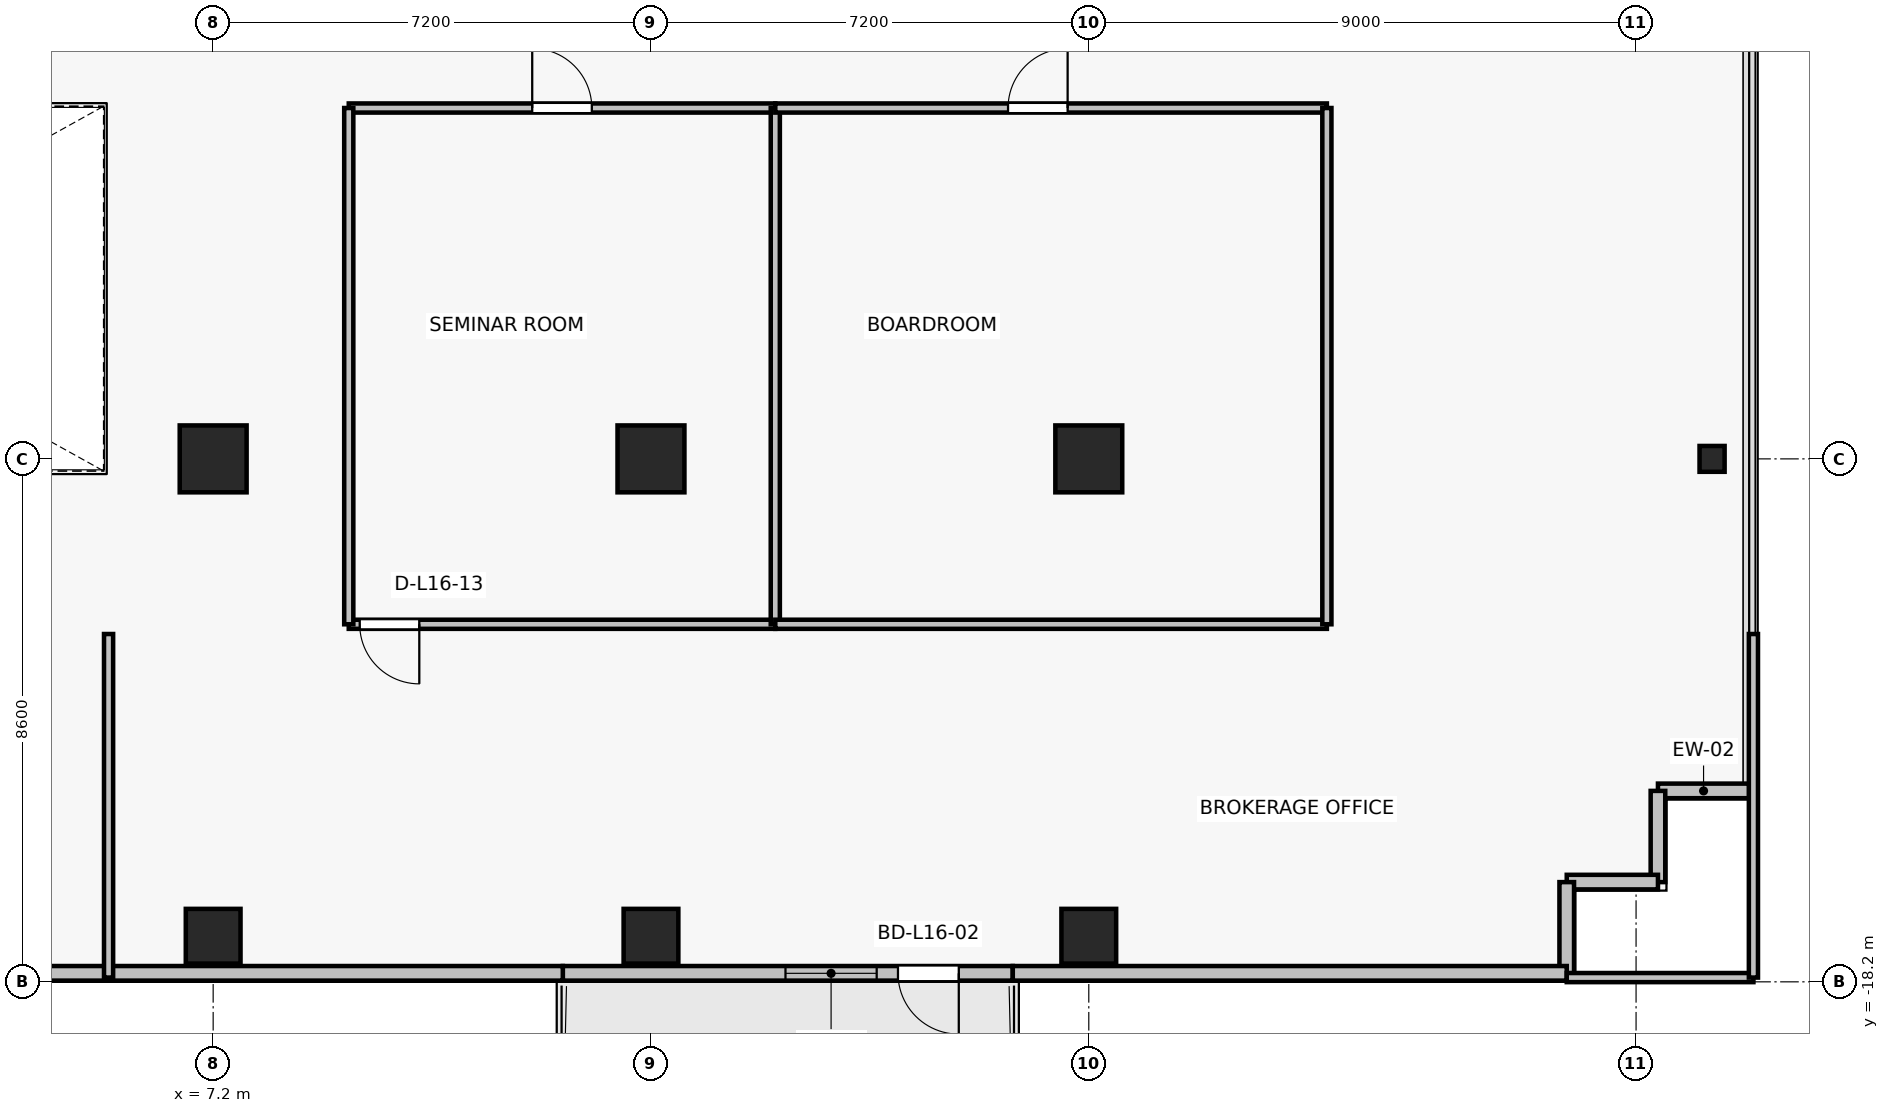
"""IFC4 building model, lengths in metres.
Left out: names, types, materials, properties, quantities, classifications, styles, units other than length and angle.
Written with IfcOpenShell. Run it as: python <this file> out.ifc"""

import sys

from ifc_helpers import new_model, si_unit, direction, frame, frame_2d, origin, origin_2d, place, context, subcontext, project, spatial, rectangle, i_section, extrude, source, transform, mapped, element, fill, save


model = new_model("IFC4")
c1 = context("Model", 3, precision=1e-05, world=origin(), true_north=direction((0.0, 1.0)))
c2 = subcontext(c1, "Body", "Model", "MODEL_VIEW")
j1 = project(units=[si_unit("LENGTHUNIT", "METRE"), si_unit("PLANEANGLEUNIT", "RADIAN")], contexts=[c1])
p1 = place(None, origin())
s1 = spatial("IfcSite", under=j1, at=p1, CompositionType="ELEMENT")
p2 = place(p1, origin())
s2 = spatial("IfcBuilding", under=s1, at=p2, CompositionType="ELEMENT")
p3 = place(p2, frame((0.0, 0.0, 60.4)))
s3 = spatial("IfcBuildingStorey", under=s2, at=p3, CompositionType="ELEMENT", Elevation=60.4)
for number, where, z_axis, x_axis in (
    (1, (7.2, -9.6, 0.0), (0.0, 0.0, 1.0), (1.0, 0.0, 0.0)),
    (2, (14.4, -9.6, 0.0), (0.0, 0.0, 1.0), (1.0, 0.0, 0.0)),
    (3, (21.6, -9.6, 0.0), (0.0, 0.0, 1.0), (1.0, 0.0, 0.0)),
):
    element("IfcColumn", number, at=place(p3, frame(where, z_axis=z_axis, x_axis=x_axis)), inside=s3, PredefinedType="COLUMN", context=c2, shape_type="SweptSolid", body=[
        extrude(rectangle(XDim=1.1, YDim=1.1, at=origin_2d()), origin(), (0.0, 0.0, 1.0), 3.3),
    ])
for number, where, z_axis, x_axis in (
    (4, (7.2, -17.45, 0.0), (0.0, 0.0, 1.0), (1.0, 0.0, 0.0)),
    (5, (14.4, -17.45, 0.0), (0.0, 0.0, 1.0), (1.0, 0.0, 0.0)),
    (6, (21.6, -17.45, 0.0), (0.0, 0.0, 1.0), (1.0, 0.0, 0.0)),
):
    element("IfcColumn", number, at=place(p3, frame(where, z_axis=z_axis, x_axis=x_axis)), inside=s3, PredefinedType="COLUMN", context=c2, shape_type="SweptSolid", body=[
        extrude(rectangle(XDim=0.9, YDim=0.9, at=origin_2d()), origin(), (0.0, 0.0, 1.0), 3.3),
    ])
p4 = place(p3, frame((31.85, -9.6, 0.0), z_axis=(0.0, 0.0, 1.0), x_axis=(1.0, 0.0, 0.0)))
e7 = element("IfcColumn", 7, at=p4, inside=s3, PredefinedType="COLUMN", context=c2, shape_type="SweptSolid", body=[
    extrude(i_section(OverallWidth=0.412, OverallDepth=0.425, WebThickness=0.026, FlangeThickness=0.039, FilletRadius=0.015, at=origin_2d()), origin(), (0.0, 0.0, 1.0), 3.3),
])
p5 = place(p3, frame((20.35, -18.06, 0.0), z_axis=(0.0, 0.0, 1.0), x_axis=(-1.0, 0.0, 0.0)))
e8 = element("IfcWall", 8, at=p5, inside=s3, PredefinedType="SOLIDWALL", context=c2, shape_type="SweptSolid", body=[
    extrude(rectangle(XDim=7.4, YDim=0.24, at=frame_2d((3.7, 0.0))), origin(), (0.0, 0.0, 1.0), 2.665),
])
p6 = place(p5, frame((0.888, 0.0, 0.0)))
e9 = element("IfcOpeningElement", 9, at=p6, cuts=e8, PredefinedType="OPENING", context=c2, shape_type="SweptSolid", body=[
    extrude(rectangle(XDim=1.0, YDim=2.2, at=frame_2d((0.5, 1.1))), frame((0.0, 0.13, 0.0), z_axis=(0.0, -1.0, 0.0), x_axis=(1.0, 0.0, 0.0)), (0.0, 0.0, 1.0), 0.26),
])
p7 = place(p5, frame((2.238, 0.0, 0.85)))
e10 = element("IfcOpeningElement", 10, at=p7, cuts=e8, PredefinedType="OPENING", context=c2, shape_type="SweptSolid", body=[
    extrude(rectangle(XDim=1.5, YDim=1.6, at=frame_2d((0.75, 0.8))), frame((0.0, 0.13, 0.0), z_axis=(0.0, -1.0, 0.0), x_axis=(1.0, 0.0, 0.0)), (0.0, 0.0, 1.0), 0.26),
])
for number, where, z_axis, x_axis in (
    (11, (30.96, -15.06, 0.0), (0.0, 0.0, 1.0), (1.0, 0.0, 0.0)),
    (12, (30.96, -16.56, 0.0), (0.0, 0.0, 1.0), (0.0, 1.0, 0.0)),
    (13, (29.46, -16.56, 0.0), (0.0, 0.0, 1.0), (1.0, 0.0, 0.0)),
    (14, (29.46, -18.06, 0.0), (0.0, 0.0, 1.0), (0.0, 1.0, 0.0)),
):
    element("IfcWall", number, at=place(p3, frame(where, z_axis=z_axis, x_axis=x_axis)), inside=s3, PredefinedType="SOLIDWALL", context=c2, shape_type="SweptSolid", body=[
        extrude(rectangle(XDim=1.5, YDim=0.24, at=frame_2d((0.75, 0.0))), origin(), (0.0, 0.0, 1.0), 3.075),
    ])
p8 = place(p3, frame((20.35, -18.06, 0.0), z_axis=(0.0, 0.0, 1.0), x_axis=(1.0, 0.0, 0.0)))
e15 = element("IfcWall", 15, at=p8, inside=s3, PredefinedType="SOLIDWALL", context=c2, shape_type="SweptSolid", body=[
    extrude(rectangle(XDim=9.11, YDim=0.24, at=frame_2d((4.555, 0.0))), origin(), (0.0, 0.0, 1.0), 3.075),
])
p9 = place(p3, frame((3.34, -18.06, 0.0), z_axis=(0.0, 0.0, 1.0), x_axis=(1.0, 0.0, 0.0)))
e16 = element("IfcWall", 16, at=p9, inside=s3, PredefinedType="SOLIDWALL", context=c2, shape_type="SweptSolid", body=[
    extrude(rectangle(XDim=9.61, YDim=0.24, at=frame_2d((4.805, 0.0))), origin(), (0.0, 0.0, 1.0), 2.665),
])
p10 = place(p3, frame((16.445, -12.32, 0.0), z_axis=(0.0, 0.0, 1.0), x_axis=(-1.0, 0.0, 0.0)))
e17 = element("IfcWall", 17, at=p10, inside=s3, PredefinedType="PARTITIONING", context=c2, shape_type="SweptSolid", body=[
    extrude(rectangle(XDim=7.015, YDim=0.15, at=frame_2d((3.507, 0.0))), origin(), (0.0, 0.0, 1.0), 2.465),
])
p11 = place(p10, frame((5.854, 0.0, 0.0)))
e18 = element("IfcOpeningElement", 18, at=p11, cuts=e17, PredefinedType="OPENING", context=c2, shape_type="SweptSolid", body=[
    extrude(rectangle(XDim=0.98, YDim=2.15, at=frame_2d((0.49, 1.075))), frame((0.0, 0.085, 0.0), z_axis=(0.0, -1.0, 0.0), x_axis=(1.0, 0.0, 0.0)), (0.0, 0.0, 1.0), 0.17),
])
p12 = place(p3, frame((9.43, -3.83, 0.0), z_axis=(0.0, 0.0, 1.0), x_axis=(1.0, 0.0, 0.0)))
e19 = element("IfcWall", 19, at=p12, inside=s3, PredefinedType="PARTITIONING", context=c2, shape_type="SweptSolid", body=[
    extrude(rectangle(XDim=7.015, YDim=0.15, at=frame_2d((3.507, 0.0))), origin(), (0.0, 0.0, 1.0), 2.465),
])
p13 = place(p12, frame((3.017, 0.0, 0.0)))
e20 = element("IfcOpeningElement", 20, at=p13, cuts=e19, PredefinedType="OPENING", context=c2, shape_type="SweptSolid", body=[
    extrude(rectangle(XDim=0.98, YDim=2.15, at=frame_2d((0.49, 1.075))), frame((0.0, 0.085, 0.0), z_axis=(0.0, -1.0, 0.0), x_axis=(1.0, 0.0, 0.0)), (0.0, 0.0, 1.0), 0.17),
])
for number, where, z_axis, x_axis in (
    (21, (9.43, -12.32, 0.0), (0.0, 0.0, 1.0), (0.0, 1.0, 0.0)),
    (22, (16.445, -3.83, 0.0), (0.0, 0.0, 1.0), (0.0, -1.0, 0.0)),
):
    element("IfcWall", number, at=place(p3, frame(where, z_axis=z_axis, x_axis=x_axis)), inside=s3, PredefinedType="PARTITIONING", context=c2, shape_type="SweptSolid", body=[
        extrude(rectangle(XDim=8.49, YDim=0.15, at=frame_2d((4.245, 0.0))), origin(), (0.0, 0.0, 1.0), 2.465),
    ])
p14 = place(p3, frame((25.515, -12.32, 0.0), z_axis=(0.0, 0.0, 1.0), x_axis=(-1.0, 0.0, 0.0)))
e23 = element("IfcWall", 23, at=p14, inside=s3, PredefinedType="PARTITIONING", context=c2, shape_type="SweptSolid", body=[
    extrude(rectangle(XDim=9.071, YDim=0.15, at=frame_2d((4.535, 0.0))), origin(), (0.0, 0.0, 1.0), 2.465),
])
p15 = place(p3, frame((16.445, -3.83, 0.0), z_axis=(0.0, 0.0, 1.0), x_axis=(1.0, 0.0, 0.0)))
e24 = element("IfcWall", 24, at=p15, inside=s3, PredefinedType="PARTITIONING", context=c2, shape_type="SweptSolid", body=[
    extrude(rectangle(XDim=9.071, YDim=0.15, at=frame_2d((4.535, 0.0))), origin(), (0.0, 0.0, 1.0), 2.465),
])
p16 = place(p15, frame((3.827, 0.0, 0.0)))
e25 = element("IfcOpeningElement", 25, at=p16, cuts=e24, PredefinedType="OPENING", context=c2, shape_type="SweptSolid", body=[
    extrude(rectangle(XDim=0.98, YDim=2.15, at=frame_2d((0.49, 1.075))), frame((0.0, 0.085, 0.0), z_axis=(0.0, -1.0, 0.0), x_axis=(1.0, 0.0, 0.0)), (0.0, 0.0, 1.0), 0.17),
])
p17 = place(p3, frame((25.515, -3.83, 0.0), z_axis=(0.0, 0.0, 1.0), x_axis=(0.0, -1.0, 0.0)))
e26 = element("IfcWall", 26, at=p17, inside=s3, PredefinedType="PARTITIONING", context=c2, shape_type="SweptSolid", body=[
    extrude(rectangle(XDim=8.49, YDim=0.15, at=frame_2d((4.245, 0.0))), origin(), (0.0, 0.0, 1.0), 2.465),
])
p18 = place(p3, frame((32.53, -18.13, 0.0), z_axis=(0.0, 0.0, 1.0), x_axis=(-1.0, 0.0, 0.0)))
e27 = element("IfcWall", 27, at=p18, inside=s3, PredefinedType="PARTITIONING", context=c2, shape_type="SweptSolid", body=[
    extrude(rectangle(XDim=3.07, YDim=0.15, at=frame_2d((1.535, 0.0))), origin(), (0.0, 0.0, 1.0), 2.665),
])
p19 = place(p3, frame((5.48, -18.13, 0.0), z_axis=(0.0, 0.0, 1.0), x_axis=(0.0, 1.0, 0.0)))
e28 = element("IfcWall", 28, at=p19, inside=s3, PredefinedType="PARTITIONING", context=c2, shape_type="SweptSolid", body=[
    extrude(rectangle(XDim=5.65, YDim=0.15, at=frame_2d((2.825, 0.0))), origin(), (0.0, 0.0, 1.0), 2.465),
])
p20 = place(p3, frame((32.53, -12.48, 0.0), z_axis=(0.0, 0.0, 1.0), x_axis=(0.0, -1.0, 0.0)))
e29 = element("IfcWall", 29, at=p20, inside=s3, PredefinedType="PARTITIONING", context=c2, shape_type="SweptSolid", body=[
    extrude(rectangle(XDim=5.65, YDim=0.15, at=frame_2d((2.825, 0.0))), origin(), (0.0, 0.0, 1.0), 3.075),
])
m1 = source(origin(), c2, "Body", "SweptSolid", [
    extrude(rectangle(XDim=1.0, YDim=2.2, at=frame_2d((0.5, 1.1))), frame((0.0, 0.025, 0.0), z_axis=(0.0, -1.0, 0.0), x_axis=(1.0, 0.0, 0.0)), (0.0, 0.0, 1.0), 0.05),
])
p21 = place(p6, origin())
e30 = element("IfcDoor", 30, at=p21, inside=s3, OperationType="SINGLE_SWING_LEFT", PredefinedType="DOOR", context=c2, shape_type="MappedRepresentation", body=[
    mapped(m1, transform((0.0, 0.0, 0.0), x_axis=(1.0, 0.0, 0.0), y_axis=(0.0, 1.0, 0.0), z_axis=(0.0, 0.0, 1.0), scale=1.0)),
])
fill(e9, e30)
m2 = source(origin(), c2, "Body", "SweptSolid", [
    extrude(rectangle(XDim=1.5, YDim=1.6, at=frame_2d((0.75, 0.8))), frame((0.0, 0.03, 0.0), z_axis=(0.0, -1.0, 0.0), x_axis=(1.0, 0.0, 0.0)), (0.0, 0.0, 1.0), 0.06),
])
p22 = place(p7, origin())
e31 = element("IfcWindow", 31, at=p22, inside=s3, PartitioningType="SINGLE_PANEL", PredefinedType="WINDOW", context=c2, shape_type="MappedRepresentation", body=[
    mapped(m2, transform((0.0, 0.0, 0.0), x_axis=(1.0, 0.0, 0.0), y_axis=(0.0, 1.0, 0.0), z_axis=(0.0, 0.0, 1.0), scale=1.0)),
])
fill(e10, e31)
m3 = source(origin(), c2, "Body", "SweptSolid", [
    extrude(rectangle(XDim=0.98, YDim=2.15, at=frame_2d((0.49, 1.075))), frame((0.0, 0.025, 0.0), z_axis=(0.0, -1.0, 0.0), x_axis=(1.0, 0.0, 0.0)), (0.0, 0.0, 1.0), 0.05),
])
p23 = place(p13, origin())
e32 = element("IfcDoor", 32, at=p23, inside=s3, OperationType="SINGLE_SWING_LEFT", PredefinedType="DOOR", context=c2, shape_type="MappedRepresentation", body=[
    mapped(m3, transform((0.0, 0.0, 0.0), x_axis=(1.0, 0.0, 0.0), y_axis=(0.0, 1.0, 0.0), z_axis=(0.0, 0.0, 1.0), scale=1.0)),
])
fill(e20, e32)
p24 = place(p16, origin())
e33 = element("IfcDoor", 33, at=p24, inside=s3, OperationType="SINGLE_SWING_RIGHT", PredefinedType="DOOR", context=c2, shape_type="MappedRepresentation", body=[
    mapped(m3, transform((0.0, 0.0, 0.0), x_axis=(1.0, 0.0, 0.0), y_axis=(0.0, 1.0, 0.0), z_axis=(0.0, 0.0, 1.0), scale=1.0)),
])
fill(e25, e33)
p25 = place(p11, origin())
e34 = element("IfcDoor", 34, at=p25, inside=s3, OperationType="SINGLE_SWING_LEFT", PredefinedType="DOOR", context=c2, shape_type="MappedRepresentation", body=[
    mapped(m3, transform((0.0, 0.0, 0.0), x_axis=(1.0, 0.0, 0.0), y_axis=(0.0, 1.0, 0.0), z_axis=(0.0, 0.0, 1.0), scale=1.0)),
])
fill(e18, e34)
save(model, sys.argv[1])
